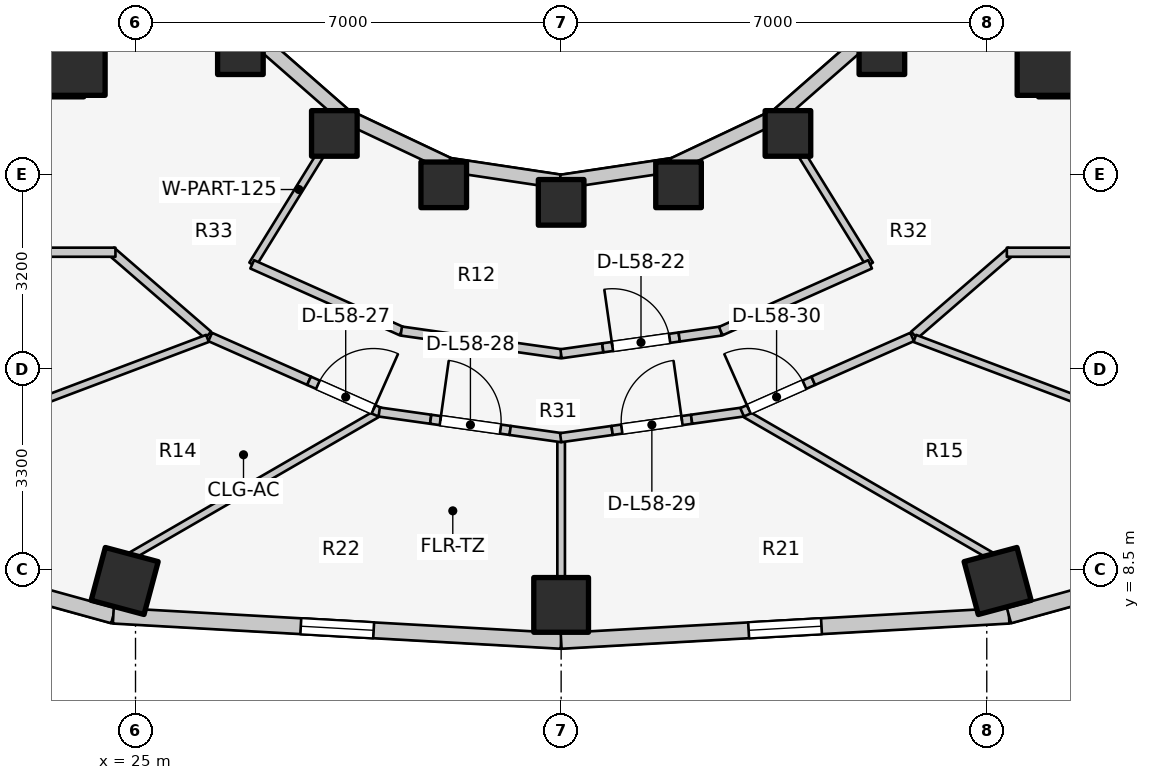
"""IFC4 building model, lengths in metres.
Left out: names, types, materials, properties, quantities, classifications, styles, units other than length and angle.
Written with IfcOpenShell. Run it as: python <this file> out.ifc"""

import sys

from ifc_helpers import new_model, si_unit, direction, frame, frame_2d, origin, origin_2d, place, context, subcontext, project, spatial, rectangle, extrude, element, fill, save


model = new_model("IFC4")
c1 = context("Model", 3, precision=1e-05, world=origin(), true_north=direction((0.0, 1.0)))
c2 = subcontext(c1, "Body", "Model", "MODEL_VIEW")
j1 = project(units=[si_unit("LENGTHUNIT", "METRE"), si_unit("PLANEANGLEUNIT", "RADIAN")], contexts=[c1])
p1 = place(None, origin())
s1 = spatial("IfcSite", under=j1, at=p1, CompositionType="ELEMENT")
p2 = place(p1, origin())
s2 = spatial("IfcBuilding", under=s1, at=p2, CompositionType="ELEMENT")
p3 = place(p2, frame((0.0, 0.0, 190.1)))
s3 = spatial("IfcBuildingStorey", under=s2, at=p3, CompositionType="ELEMENT", Elevation=190.1)
for number, where, z_axis, x_axis in (
    (1, (19.65, 16.55, 0.0), (0.0, 0.0, 1.0), (1.0, 0.0, 0.0)),
    (2, (39.85, 16.55, 0.0), (0.0, 0.0, 1.0), (1.0, 0.0, 0.0)),
):
    element("IfcWall", number, at=place(p3, frame(where, z_axis=z_axis, x_axis=x_axis)), inside=s3, PredefinedType="SHEAR", context=c2, shape_type="SweptSolid", body=[
        extrude(rectangle(XDim=4.5, YDim=0.55, at=frame_2d((2.25, 0.0))), origin(), (0.0, 0.0, 1.0), 3.1),
    ])
for number, where, z_axis, x_axis in (
    (3, (23.9, 16.9, 0.0), (0.0, 0.0, 1.0), (1.0, 0.0, 0.0)),
    (4, (40.1, 16.9, 0.0), (0.0, 0.0, 1.0), (1.0, 0.0, 0.0)),
):
    element("IfcColumn", number, at=place(p3, frame(where, z_axis=z_axis, x_axis=x_axis)), inside=s3, PredefinedType="COLUMN", context=c2, shape_type="SweptSolid", body=[
        extrude(rectangle(XDim=1.2, YDim=1.2, at=origin_2d()), origin(), (0.0, 0.0, 1.0), 3.1),
    ])
for number, where, z_axis, x_axis in (
    (5, (26.725, 17.018, 0.0), (0.0, 0.0, 1.0), (1.0, 0.0, 0.0)),
    (6, (28.27, 15.673, 0.0), (0.0, 0.0, 1.0), (1.0, 0.0, 0.0)),
    (7, (30.069, 14.828, 0.0), (0.0, 0.0, 1.0), (1.0, 0.0, 0.0)),
):
    element("IfcColumn", number, at=place(p3, frame(where, z_axis=z_axis, x_axis=x_axis)), inside=s3, PredefinedType="COLUMN", context=c2, shape_type="SweptSolid", body=[
        extrude(rectangle(XDim=0.75, YDim=0.75, at=origin_2d()), origin(), (0.0, 0.0, 1.0), 3.1),
    ])
p4 = place(p3, frame((24.822, 8.313, 0.0), z_axis=(0.0, 0.0, 1.0), x_axis=(-0.258819045103, -0.965925826289, 0.0)))
e8 = element("IfcColumn", 8, at=p4, inside=s3, PredefinedType="COLUMN", context=c2, shape_type="SweptSolid", body=[
    extrude(rectangle(XDim=0.9, YDim=0.9, at=origin_2d()), origin(), (0.0, 0.0, 1.0), 3.1),
])
p5 = place(p3, frame((32.0, 14.54, 0.0), z_axis=(0.0, 0.0, 1.0), x_axis=(1.0, 0.0, 0.0)))
e9 = element("IfcColumn", 9, at=p5, inside=s3, PredefinedType="COLUMN", context=c2, shape_type="SweptSolid", body=[
    extrude(rectangle(XDim=0.75, YDim=0.75, at=origin_2d()), origin(), (0.0, 0.0, 1.0), 3.1),
])
p6 = place(p3, frame((32.0, 7.92, 0.0), z_axis=(0.0, 0.0, 1.0), x_axis=(0.0, -1.0, 0.0)))
e10 = element("IfcColumn", 10, at=p6, inside=s3, PredefinedType="COLUMN", context=c2, shape_type="SweptSolid", body=[
    extrude(rectangle(XDim=0.9, YDim=0.9, at=origin_2d()), origin(), (0.0, 0.0, 1.0), 3.1),
])
p7 = place(p3, frame((33.931, 14.828, 0.0), z_axis=(0.0, 0.0, 1.0), x_axis=(1.0, 0.0, 0.0)))
e11 = element("IfcColumn", 11, at=p7, inside=s3, PredefinedType="COLUMN", context=c2, shape_type="SweptSolid", body=[
    extrude(rectangle(XDim=0.75, YDim=0.75, at=origin_2d()), origin(), (0.0, 0.0, 1.0), 3.1),
])
p8 = place(p3, frame((39.178, 8.313, 0.0), z_axis=(0.0, 0.0, 1.0), x_axis=(0.258819045103, -0.965925826289, 0.0)))
e12 = element("IfcColumn", 12, at=p8, inside=s3, PredefinedType="COLUMN", context=c2, shape_type="SweptSolid", body=[
    extrude(rectangle(XDim=0.9, YDim=0.9, at=origin_2d()), origin(), (0.0, 0.0, 1.0), 3.1),
])
for number, where, z_axis, x_axis in (
    (13, (35.73, 15.673, 0.0), (0.0, 0.0, 1.0), (1.0, 0.0, 0.0)),
    (14, (37.275, 17.018, 0.0), (0.0, 0.0, 1.0), (1.0, 0.0, 0.0)),
):
    element("IfcColumn", number, at=place(p3, frame(where, z_axis=z_axis, x_axis=x_axis)), inside=s3, PredefinedType="COLUMN", context=c2, shape_type="SweptSolid", body=[
        extrude(rectangle(XDim=0.75, YDim=0.75, at=origin_2d()), origin(), (0.0, 0.0, 1.0), 3.1),
    ])
p9 = place(p3, frame((26.965, 17.258, 0.0), z_axis=(0.0, 0.0, 1.0), x_axis=(0.752576694707, -0.658504607869, 0.0)))
e15 = element("IfcWall", 15, at=p9, inside=s3, PredefinedType="STANDARD", context=c2, shape_type="SweptSolid", body=[
    extrude(rectangle(XDim=1.959, YDim=0.23, at=frame_2d((0.98, 0.0))), origin(), (0.0, 0.0, 1.0), 1.22),
])
p10 = place(p3, frame((28.44, 15.968, 0.0), z_axis=(0.0, 0.0, 1.0), x_axis=(0.904179699603, -0.427152280606, 0.0)))
e16 = element("IfcWall", 16, at=p10, inside=s3, PredefinedType="STANDARD", context=c2, shape_type="SweptSolid", body=[
    extrude(rectangle(XDim=1.899, YDim=0.23, at=frame_2d((0.95, 0.0))), origin(), (0.0, 0.0, 1.0), 1.22),
])
for number, where, z_axis, x_axis in (
    (17, (30.157, 15.157, 0.0), (0.0, 0.0, 1.0), (0.989, -0.149, 0.0)),
    (18, (32.0, 14.88, 0.0), (0.0, 0.0, 1.0), (0.989, 0.149, 0.0)),
):
    element("IfcWall", number, at=place(p3, frame(where, z_axis=z_axis, x_axis=x_axis)), inside=s3, PredefinedType="STANDARD", context=c2, shape_type="SweptSolid", body=[
        extrude(rectangle(XDim=1.864, YDim=0.23, at=frame_2d((0.932, 0.0))), origin(), (0.0, 0.0, 1.0), 1.22),
    ])
p11 = place(p3, frame((33.843, 15.157, 0.0), z_axis=(0.0, 0.0, 1.0), x_axis=(0.904179699603, 0.427152280606, 0.0)))
e19 = element("IfcWall", 19, at=p11, inside=s3, PredefinedType="STANDARD", context=c2, shape_type="SweptSolid", body=[
    extrude(rectangle(XDim=1.899, YDim=0.23, at=frame_2d((0.95, 0.0))), origin(), (0.0, 0.0, 1.0), 1.22),
])
p12 = place(p3, frame((35.56, 15.968, 0.0), z_axis=(0.0, 0.0, 1.0), x_axis=(0.752576694707, 0.658504607869, 0.0)))
e20 = element("IfcWall", 20, at=p12, inside=s3, PredefinedType="STANDARD", context=c2, shape_type="SweptSolid", body=[
    extrude(rectangle(XDim=1.959, YDim=0.23, at=frame_2d((0.98, 0.0))), origin(), (0.0, 0.0, 1.0), 1.22),
])
p13 = place(p3, frame((19.587, 9.137, 0.0), z_axis=(0.0, 0.0, 1.0), x_axis=(0.963953455704, -0.26607092144, 0.0)))
e21 = element("IfcWall", 21, at=p13, inside=s3, PredefinedType="STANDARD", context=c2, shape_type="SweptSolid", body=[
    extrude(rectangle(XDim=5.237, YDim=0.26, at=frame_2d((2.618, 0.0))), origin(), (0.0, 0.0, 1.0), 1.22),
])
p14 = place(p13, frame((2.018, 0.0, 0.15)))
e22 = element("IfcOpeningElement", 22, at=p14, cuts=e21, PredefinedType="OPENING", context=c2, shape_type="SweptSolid", body=[
    extrude(rectangle(XDim=1.2, YDim=0.9, at=frame_2d((0.6, 0.45))), frame((0.0, 0.14, 0.0), z_axis=(0.0, -1.0, 0.0), x_axis=(1.0, 0.0, 0.0)), (0.0, 0.0, 1.0), 0.28),
])
p15 = place(p3, frame((24.635, 7.743, 0.0), z_axis=(0.0, 0.0, 1.0), x_axis=(0.998417906562, -0.056228852534, 0.0)))
e23 = element("IfcWall", 23, at=p15, inside=s3, PredefinedType="STANDARD", context=c2, shape_type="SweptSolid", body=[
    extrude(rectangle(XDim=7.377, YDim=0.26, at=frame_2d((3.688, 0.0))), origin(), (0.0, 0.0, 1.0), 1.22),
])
p16 = place(p15, frame((3.088, 0.0, 0.15)))
e24 = element("IfcOpeningElement", 24, at=p16, cuts=e23, PredefinedType="OPENING", context=c2, shape_type="SweptSolid", body=[
    extrude(rectangle(XDim=1.2, YDim=0.9, at=frame_2d((0.6, 0.45))), frame((0.0, 0.14, 0.0), z_axis=(0.0, -1.0, 0.0), x_axis=(1.0, 0.0, 0.0)), (0.0, 0.0, 1.0), 0.28),
])
p17 = place(p3, frame((32.0, 7.329, 0.0), z_axis=(0.0, 0.0, 1.0), x_axis=(0.998417906562, 0.056228852534, 0.0)))
e25 = element("IfcWall", 25, at=p17, inside=s3, PredefinedType="STANDARD", context=c2, shape_type="SweptSolid", body=[
    extrude(rectangle(XDim=7.377, YDim=0.26, at=frame_2d((3.688, 0.0))), origin(), (0.0, 0.0, 1.0), 1.22),
])
p18 = place(p17, frame((3.088, 0.0, 0.15)))
e26 = element("IfcOpeningElement", 26, at=p18, cuts=e25, PredefinedType="OPENING", context=c2, shape_type="SweptSolid", body=[
    extrude(rectangle(XDim=1.2, YDim=0.9, at=frame_2d((0.6, 0.45))), frame((0.0, 0.14, 0.0), z_axis=(0.0, -1.0, 0.0), x_axis=(1.0, 0.0, 0.0)), (0.0, 0.0, 1.0), 0.28),
])
p19 = place(p3, frame((39.365, 7.743, 0.0), z_axis=(0.0, 0.0, 1.0), x_axis=(0.963953455704, 0.26607092144, 0.0)))
e27 = element("IfcWall", 27, at=p19, inside=s3, PredefinedType="STANDARD", context=c2, shape_type="SweptSolid", body=[
    extrude(rectangle(XDim=5.237, YDim=0.26, at=frame_2d((2.618, 0.0))), origin(), (0.0, 0.0, 1.0), 1.22),
])
p20 = place(p19, frame((2.018, 0.0, 0.15)))
e28 = element("IfcOpeningElement", 28, at=p20, cuts=e27, PredefinedType="OPENING", context=c2, shape_type="SweptSolid", body=[
    extrude(rectangle(XDim=1.2, YDim=0.9, at=frame_2d((0.6, 0.45))), frame((0.0, 0.14, 0.0), z_axis=(0.0, -1.0, 0.0), x_axis=(1.0, 0.0, 0.0)), (0.0, 0.0, 1.0), 0.28),
])
p21 = place(p3, frame((26.193, 12.358, 0.0), z_axis=(0.0, 0.0, 1.0), x_axis=(-0.756055312247, 0.654507727092, 0.0)))
e29 = element("IfcWall", 29, at=p21, inside=s3, PredefinedType="PARTITIONING", context=c2, shape_type="SweptSolid", body=[
    extrude(rectangle(XDim=2.111, YDim=0.15, at=frame_2d((1.055, 0.0))), origin(), (0.0, 0.0, 1.0), 1.22),
])
p22 = place(p3, frame((19.51, 13.72, 0.0), z_axis=(0.0, 0.0, 1.0), x_axis=(1.0, 0.0, 0.0)))
e30 = element("IfcWall", 30, at=p22, inside=s3, PredefinedType="PARTITIONING", context=c2, shape_type="SweptSolid", body=[
    extrude(rectangle(XDim=5.16, YDim=0.15, at=frame_2d((2.58, 0.0))), origin(), (0.0, 0.0, 1.0), 1.22),
])
p23 = place(p3, frame((37.807, 12.358, 0.0), z_axis=(0.0, 0.0, 1.0), x_axis=(0.756055312247, 0.654507727092, 0.0)))
e31 = element("IfcWall", 31, at=p23, inside=s3, PredefinedType="PARTITIONING", context=c2, shape_type="SweptSolid", body=[
    extrude(rectangle(XDim=2.111, YDim=0.15, at=frame_2d((1.055, 0.0))), origin(), (0.0, 0.0, 1.0), 1.22),
])
p24 = place(p3, frame((39.33, 13.72, 0.0), z_axis=(0.0, 0.0, 1.0), x_axis=(1.0, 0.0, 0.0)))
e32 = element("IfcWall", 32, at=p24, inside=s3, PredefinedType="PARTITIONING", context=c2, shape_type="SweptSolid", body=[
    extrude(rectangle(XDim=5.158, YDim=0.15, at=frame_2d((2.579, 0.0))), origin(), (0.0, 0.0, 1.0), 1.22),
])
for number, where, z_axis, x_axis in (
    (33, (28.45, 15.985, 0.0), (0.0, 0.0, 1.0), (-0.526, -0.851, 0.0)),
    (34, (35.55, 15.985, 0.0), (0.0, 0.0, 1.0), (0.526, -0.851, 0.0)),
):
    element("IfcWall", number, at=place(p3, frame(where, z_axis=z_axis, x_axis=x_axis)), inside=s3, PredefinedType="PARTITIONING", context=c2, shape_type="SweptSolid", body=[
        extrude(rectangle(XDim=2.901, YDim=0.125, at=frame_2d((1.451, 0.0))), origin(), (0.0, 0.0, 1.0), 1.22),
    ])
p25 = place(p3, frame((26.919, 13.521, 0.0), z_axis=(0.0, 0.0, 1.0), x_axis=(0.912888568324, -0.408208845842, 0.0)))
e35 = element("IfcWall", 35, at=p25, inside=s3, PredefinedType="PARTITIONING", context=c2, shape_type="SweptSolid", body=[
    extrude(rectangle(XDim=2.69, YDim=0.15, at=frame_2d((1.345, 0.0))), origin(), (0.0, 0.0, 1.0), 1.22),
])
p26 = place(p3, frame((29.371, 12.424, 0.0), z_axis=(0.0, 0.0, 1.0), x_axis=(0.990066775667, -0.1405979364, 0.0)))
e36 = element("IfcWall", 36, at=p26, inside=s3, PredefinedType="PARTITIONING", context=c2, shape_type="SweptSolid", body=[
    extrude(rectangle(XDim=2.657, YDim=0.15, at=frame_2d((1.328, 0.0))), origin(), (0.0, 0.0, 1.0), 1.22),
])
p27 = place(p3, frame((31.998, 12.05, 0.0), z_axis=(0.0, 0.0, 1.0), x_axis=(0.990082845611, 0.140484728093, 0.0)))
e37 = element("IfcWall", 37, at=p27, inside=s3, PredefinedType="PARTITIONING", context=c2, shape_type="SweptSolid", body=[
    extrude(rectangle(XDim=0.693, YDim=0.15, at=frame_2d((0.347, 0.0))), origin(), (0.0, 0.0, 1.0), 1.22),
])
p28 = place(p3, frame((32.685, 12.147, 0.0), z_axis=(0.0, 0.0, 1.0), x_axis=(0.990049212475, 0.140721557967, 0.0)))
e38 = element("IfcWall", 38, at=p28, inside=s3, PredefinedType="PARTITIONING", context=c2, shape_type="SweptSolid", body=[
    extrude(rectangle(XDim=1.27, YDim=0.15, at=frame_2d((0.635, 0.0))), origin(), (0.0, 0.0, 1.0), 2.575),
])
p29 = place(p28, frame((0.16, 0.0, 0.0)))
e39 = element("IfcOpeningElement", 39, at=p29, cuts=e38, PredefinedType="OPENING", context=c2, shape_type="SweptSolid", body=[
    extrude(rectangle(XDim=0.95, YDim=2.1, at=frame_2d((0.475, 1.05))), frame((0.0, 0.085, 0.0), z_axis=(0.0, -1.0, 0.0), x_axis=(1.0, 0.0, 0.0)), (0.0, 0.0, 1.0), 0.17),
])
p30 = place(p3, frame((33.942, 12.326, 0.0), z_axis=(0.0, 0.0, 1.0), x_axis=(0.990082845611, 0.140484728093, 0.0)))
e40 = element("IfcWall", 40, at=p30, inside=s3, PredefinedType="PARTITIONING", context=c2, shape_type="SweptSolid", body=[
    extrude(rectangle(XDim=0.693, YDim=0.15, at=frame_2d((0.347, 0.0))), origin(), (0.0, 0.0, 1.0), 2.575),
])
p31 = place(p3, frame((34.625, 12.423, 0.0), z_axis=(0.0, 0.0, 1.0), x_axis=(0.912888568324, 0.408208845842, 0.0)))
e41 = element("IfcWall", 41, at=p31, inside=s3, PredefinedType="PARTITIONING", context=c2, shape_type="SweptSolid", body=[
    extrude(rectangle(XDim=2.69, YDim=0.15, at=frame_2d((1.345, 0.0))), origin(), (0.0, 0.0, 1.0), 1.22),
])
p32 = place(p3, frame((26.184, 12.302, 0.0), z_axis=(0.0, 0.0, 1.0), x_axis=(-0.935601484289, -0.353057874288, 0.0)))
e42 = element("IfcWall", 42, at=p32, inside=s3, PredefinedType="PARTITIONING", context=c2, shape_type="SweptSolid", body=[
    extrude(rectangle(XDim=6.484, YDim=0.125, at=frame_2d((3.242, 0.0))), origin(), (0.0, 0.0, 1.0), 1.22),
])
p33 = place(p3, frame((28.968, 11.062, 0.0), z_axis=(0.0, 0.0, 1.0), x_axis=(-0.865627016774, -0.500689392568, 0.0)))
e43 = element("IfcWall", 43, at=p33, inside=s3, PredefinedType="PARTITIONING", context=c2, shape_type="SweptSolid", body=[
    extrude(rectangle(XDim=4.662, YDim=0.125, at=frame_2d((2.331, 0.0))), origin(), (0.0, 0.0, 1.0), 1.22),
])
p34 = place(p3, frame((32.0, 10.615, 0.0), z_axis=(0.0, 0.0, 1.0), x_axis=(0.0, -1.0, 0.0)))
e44 = element("IfcWall", 44, at=p34, inside=s3, PredefinedType="PARTITIONING", context=c2, shape_type="SweptSolid", body=[
    extrude(rectangle(XDim=2.265, YDim=0.125, at=frame_2d((1.132, 0.0))), origin(), (0.0, 0.0, 1.0), 1.22),
])
p35 = place(p3, frame((35.032, 11.062, 0.0), z_axis=(0.0, 0.0, 1.0), x_axis=(0.865627016774, -0.500689392568, 0.0)))
e45 = element("IfcWall", 45, at=p35, inside=s3, PredefinedType="PARTITIONING", context=c2, shape_type="SweptSolid", body=[
    extrude(rectangle(XDim=4.662, YDim=0.125, at=frame_2d((2.331, 0.0))), origin(), (0.0, 0.0, 1.0), 1.22),
])
p36 = place(p3, frame((37.816, 12.302, 0.0), z_axis=(0.0, 0.0, 1.0), x_axis=(0.935601484289, -0.353057874288, 0.0)))
e46 = element("IfcWall", 46, at=p36, inside=s3, PredefinedType="PARTITIONING", context=c2, shape_type="SweptSolid", body=[
    extrude(rectangle(XDim=6.484, YDim=0.125, at=frame_2d((3.242, 0.0))), origin(), (0.0, 0.0, 1.0), 1.22),
])
p37 = place(p3, frame((26.228, 12.326, 0.0), z_axis=(0.0, 0.0, 1.0), x_axis=(0.914303617865, -0.405029498135, 0.0)))
e47 = element("IfcWall", 47, at=p37, inside=s3, PredefinedType="PARTITIONING", context=c2, shape_type="SweptSolid", body=[
    extrude(rectangle(XDim=1.778, YDim=0.15, at=frame_2d((0.889, 0.0))), origin(), (0.0, 0.0, 1.0), 1.22),
])
p38 = place(p3, frame((27.853, 11.606, 0.0), z_axis=(0.0, 0.0, 1.0), x_axis=(0.91435342481, -0.40491704649, 0.0)))
e48 = element("IfcWall", 48, at=p38, inside=s3, PredefinedType="PARTITIONING", context=c2, shape_type="SweptSolid", body=[
    extrude(rectangle(XDim=1.28, YDim=0.15, at=frame_2d((0.64, 0.0))), origin(), (0.0, 0.0, 1.0), 2.16),
])
p39 = place(p38, frame((0.16, 0.0, 0.0)))
e49 = element("IfcOpeningElement", 49, at=p39, cuts=e48, PredefinedType="OPENING", context=c2, shape_type="SweptSolid", body=[
    extrude(rectangle(XDim=1.0, YDim=2.1, at=frame_2d((0.5, 1.05))), frame((0.0, 0.085, 0.0), z_axis=(0.0, -1.0, 0.0), x_axis=(1.0, 0.0, 0.0)), (0.0, 0.0, 1.0), 0.17),
])
p40 = place(p3, frame((29.008, 11.092, 0.0), z_axis=(0.0, 0.0, 1.0), x_axis=(0.990238723834, -0.139381741342, 0.0)))
e50 = element("IfcWall", 50, at=p40, inside=s3, PredefinedType="PARTITIONING", context=c2, shape_type="SweptSolid", body=[
    extrude(rectangle(XDim=0.855, YDim=0.15, at=frame_2d((0.427, 0.0))), origin(), (0.0, 0.0, 1.0), 2.575),
])
p41 = place(p3, frame((29.854, 10.973, 0.0), z_axis=(0.0, 0.0, 1.0), x_axis=(0.990254187593, -0.139271834751, 0.0)))
e51 = element("IfcWall", 51, at=p41, inside=s3, PredefinedType="PARTITIONING", context=c2, shape_type="SweptSolid", body=[
    extrude(rectangle(XDim=1.32, YDim=0.15, at=frame_2d((0.66, 0.0))), origin(), (0.0, 0.0, 1.0), 2.575),
])
p42 = place(p41, frame((0.16, 0.0, 0.0)))
e52 = element("IfcOpeningElement", 52, at=p42, cuts=e51, PredefinedType="OPENING", context=c2, shape_type="SweptSolid", body=[
    extrude(rectangle(XDim=1.0, YDim=2.1, at=frame_2d((0.5, 1.05))), frame((0.0, 0.085, 0.0), z_axis=(0.0, -1.0, 0.0), x_axis=(1.0, 0.0, 0.0)), (0.0, 0.0, 1.0), 0.17),
])
for number, where, z_axis, x_axis in (
    (53, (31.162, 10.789, 0.0), (0.0, 0.0, 1.0), (0.99, -0.14, 0.0)),
    (54, (31.992, 10.67, 0.0), (0.0, 0.0, 1.0), (0.99, 0.14, 0.0)),
):
    element("IfcWall", number, at=place(p3, frame(where, z_axis=z_axis, x_axis=x_axis)), inside=s3, PredefinedType="PARTITIONING", context=c2, shape_type="SweptSolid", body=[
        extrude(rectangle(XDim=0.855, YDim=0.15, at=frame_2d((0.427, 0.0))), origin(), (0.0, 0.0, 1.0), 1.22),
    ])
p43 = place(p3, frame((32.838, 10.789, 0.0), z_axis=(0.0, 0.0, 1.0), x_axis=(0.990254187593, 0.139271834751, 0.0)))
e55 = element("IfcWall", 55, at=p43, inside=s3, PredefinedType="PARTITIONING", context=c2, shape_type="SweptSolid", body=[
    extrude(rectangle(XDim=1.32, YDim=0.15, at=frame_2d((0.66, 0.0))), origin(), (0.0, 0.0, 1.0), 2.575),
])
p44 = place(p43, frame((0.16, 0.0, 0.0)))
e56 = element("IfcOpeningElement", 56, at=p44, cuts=e55, PredefinedType="OPENING", context=c2, shape_type="SweptSolid", body=[
    extrude(rectangle(XDim=1.0, YDim=2.1, at=frame_2d((0.5, 1.05))), frame((0.0, 0.085, 0.0), z_axis=(0.0, -1.0, 0.0), x_axis=(1.0, 0.0, 0.0)), (0.0, 0.0, 1.0), 0.17),
])
p45 = place(p3, frame((34.146, 10.973, 0.0), z_axis=(0.0, 0.0, 1.0), x_axis=(0.990238723834, 0.139381741342, 0.0)))
e57 = element("IfcWall", 57, at=p45, inside=s3, PredefinedType="PARTITIONING", context=c2, shape_type="SweptSolid", body=[
    extrude(rectangle(XDim=0.855, YDim=0.15, at=frame_2d((0.427, 0.0))), origin(), (0.0, 0.0, 1.0), 2.575),
])
p46 = place(p3, frame((34.976, 11.088, 0.0), z_axis=(0.0, 0.0, 1.0), x_axis=(0.91435342481, 0.40491704649, 0.0)))
e58 = element("IfcWall", 58, at=p46, inside=s3, PredefinedType="PARTITIONING", context=c2, shape_type="SweptSolid", body=[
    extrude(rectangle(XDim=1.28, YDim=0.15, at=frame_2d((0.64, 0.0))), origin(), (0.0, 0.0, 1.0), 2.16),
])
p47 = place(p46, frame((0.12, 0.0, 0.0)))
e59 = element("IfcOpeningElement", 59, at=p47, cuts=e58, PredefinedType="OPENING", context=c2, shape_type="SweptSolid", body=[
    extrude(rectangle(XDim=1.0, YDim=2.1, at=frame_2d((0.5, 1.05))), frame((0.0, 0.085, 0.0), z_axis=(0.0, -1.0, 0.0), x_axis=(1.0, 0.0, 0.0)), (0.0, 0.0, 1.0), 0.17),
])
p48 = place(p3, frame((36.147, 11.606, 0.0), z_axis=(0.0, 0.0, 1.0), x_axis=(0.914303617865, 0.405029498135, 0.0)))
e60 = element("IfcWall", 60, at=p48, inside=s3, PredefinedType="PARTITIONING", context=c2, shape_type="SweptSolid", body=[
    extrude(rectangle(XDim=1.778, YDim=0.15, at=frame_2d((0.889, 0.0))), origin(), (0.0, 0.0, 1.0), 1.22),
])
p49 = place(p16, origin())
e61 = element("IfcWindow", 61, at=p49, inside=s3, PartitioningType="SINGLE_PANEL", PredefinedType="WINDOW", context=c2, shape_type="SweptSolid", body=[
    extrude(rectangle(XDim=1.2, YDim=0.9, at=frame_2d((0.6, 0.45))), frame((0.0, 0.03, 0.0), z_axis=(0.0, -1.0, 0.0), x_axis=(1.0, 0.0, 0.0)), (0.0, 0.0, 1.0), 0.06),
])
fill(e24, e61)
p50 = place(p18, origin())
e62 = element("IfcWindow", 62, at=p50, inside=s3, PartitioningType="SINGLE_PANEL", PredefinedType="WINDOW", context=c2, shape_type="SweptSolid", body=[
    extrude(rectangle(XDim=1.2, YDim=0.9, at=frame_2d((0.6, 0.45))), frame((0.0, 0.03, 0.0), z_axis=(0.0, -1.0, 0.0), x_axis=(1.0, 0.0, 0.0)), (0.0, 0.0, 1.0), 0.06),
])
fill(e26, e62)
p51 = place(p29, origin())
e63 = element("IfcDoor", 63, at=p51, inside=s3, OperationType="SINGLE_SWING_LEFT", PredefinedType="DOOR", context=c2, shape_type="SweptSolid", body=[
    extrude(rectangle(XDim=0.95, YDim=2.1, at=frame_2d((0.475, 1.05))), frame((0.0, 0.025, 0.0), z_axis=(0.0, -1.0, 0.0), x_axis=(1.0, 0.0, 0.0)), (0.0, 0.0, 1.0), 0.05),
])
fill(e39, e63)
p52 = place(p39, origin())
e64 = element("IfcDoor", 64, at=p52, inside=s3, OperationType="SINGLE_SWING_RIGHT", PredefinedType="DOOR", context=c2, shape_type="SweptSolid", body=[
    extrude(rectangle(XDim=1.0, YDim=2.1, at=frame_2d((0.5, 1.05))), frame((0.0, 0.025, 0.0), z_axis=(0.0, -1.0, 0.0), x_axis=(1.0, 0.0, 0.0)), (0.0, 0.0, 1.0), 0.05),
])
fill(e49, e64)
p53 = place(p42, origin())
e65 = element("IfcDoor", 65, at=p53, inside=s3, OperationType="SINGLE_SWING_LEFT", PredefinedType="DOOR", context=c2, shape_type="SweptSolid", body=[
    extrude(rectangle(XDim=1.0, YDim=2.1, at=frame_2d((0.5, 1.05))), frame((0.0, 0.025, 0.0), z_axis=(0.0, -1.0, 0.0), x_axis=(1.0, 0.0, 0.0)), (0.0, 0.0, 1.0), 0.05),
])
fill(e52, e65)
p54 = place(p44, origin())
e66 = element("IfcDoor", 66, at=p54, inside=s3, OperationType="SINGLE_SWING_RIGHT", PredefinedType="DOOR", context=c2, shape_type="SweptSolid", body=[
    extrude(rectangle(XDim=1.0, YDim=2.1, at=frame_2d((0.5, 1.05))), frame((0.0, 0.025, 0.0), z_axis=(0.0, -1.0, 0.0), x_axis=(1.0, 0.0, 0.0)), (0.0, 0.0, 1.0), 0.05),
])
fill(e56, e66)
p55 = place(p47, origin())
e67 = element("IfcDoor", 67, at=p55, inside=s3, OperationType="SINGLE_SWING_LEFT", PredefinedType="DOOR", context=c2, shape_type="SweptSolid", body=[
    extrude(rectangle(XDim=1.0, YDim=2.1, at=frame_2d((0.5, 1.05))), frame((0.0, 0.025, 0.0), z_axis=(0.0, -1.0, 0.0), x_axis=(1.0, 0.0, 0.0)), (0.0, 0.0, 1.0), 0.05),
])
fill(e59, e67)
save(model, sys.argv[1])
